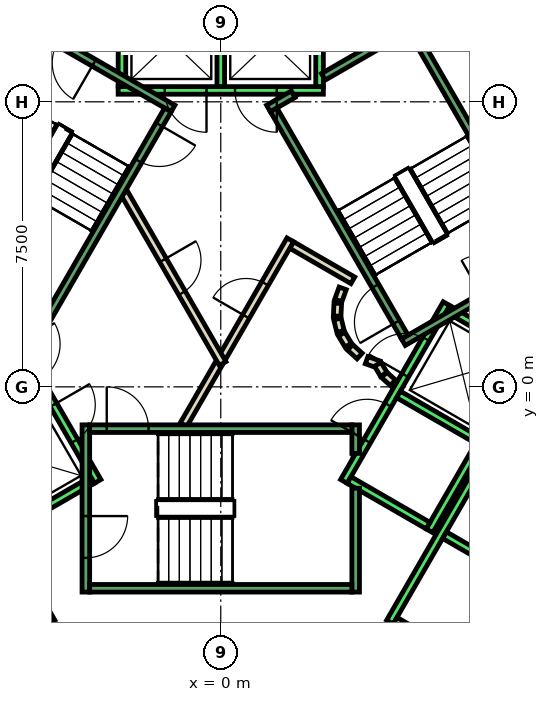
"""IFC4 building model, lengths in metres.
Left out: names, types, materials, properties, quantities, classifications, styles, units other than length and angle.
Written with IfcOpenShell. Run it as: python <this file> out.ifc"""

import sys

from ifc_helpers import new_model, si_unit, direction, frame, frame_2d, origin, place, context, subcontext, project, spatial, polyline, rectangle, outline, extrude, element, fill, save


model = new_model("IFC4")
c1 = context("Model", 3, precision=1e-05, world=origin(), true_north=direction((0.0, 1.0)))
c2 = subcontext(c1, "Body", "Model", "MODEL_VIEW")
j1 = project(units=[si_unit("LENGTHUNIT", "METRE"), si_unit("PLANEANGLEUNIT", "RADIAN")], contexts=[c1])
p1 = place(None, origin())
s1 = spatial("IfcSite", under=j1, at=p1, CompositionType="ELEMENT")
p2 = place(p1, origin())
s2 = spatial("IfcBuilding", under=s1, at=p2, CompositionType="ELEMENT")
p3 = place(p2, frame((0.0, 0.0, 184.4)))
s3 = spatial("IfcBuildingStorey", under=s2, at=p3, CompositionType="ELEMENT", Elevation=184.4)
p4 = place(p3, frame((0.0, 0.0, -0.6)))
e1 = element("IfcWall", 1, at=p4, inside=s3, PredefinedType="SHEAR", context=c2, shape_type="SweptSolid", body=[
    extrude(outline(polyline([(6.928, -9.5), (13.856, 2.5), (12.471, 2.5), (6.235, -8.3), (6.928, -9.5)])), origin(), (0.0, 0.0, 1.0), 5.4),
])
p5 = place(p3, frame((-0.982, -1.0, 0.0), z_axis=(0.0, 0.0, 1.0), x_axis=(0.50024047865, 0.865886518847, 0.0)))
e2 = element("IfcWall", 2, at=p5, inside=s3, PredefinedType="PARTITIONING", context=c2, shape_type="SweptSolid", body=[
    extrude(rectangle(XDim=1.863, YDim=0.2, at=frame_2d((0.931, 0.0))), origin(), (0.0, 0.0, 1.0), 4.8),
])
p6 = place(p3, frame((1.866, 3.732, 0.0), z_axis=(0.0, 0.0, 1.0), x_axis=(0.866043361281, -0.499968895414, 0.0)))
e3 = element("IfcWall", 3, at=p6, inside=s3, PredefinedType="PARTITIONING", context=c2, shape_type="SweptSolid", body=[
    extrude(rectangle(XDim=1.858, YDim=0.2, at=frame_2d((0.929, 0.0))), origin(), (0.0, 0.0, 1.0), 4.8),
])
p7 = place(p3, frame((3.208, 2.592, 0.0), z_axis=(0.0, 0.0, 1.0), x_axis=(-0.337388820924, -0.941365382578, 0.0)))
e4 = element("IfcWall", 4, at=p7, inside=s3, PredefinedType="PARTITIONING", context=c2, shape_type="SweptSolid", body=[
    extrude(rectangle(XDim=0.338, YDim=0.2, at=frame_2d((0.169, 0.0))), origin(), (0.0, 0.0, 1.0), 4.8),
])
p8 = place(p3, frame((3.079, 2.199, 0.0), z_axis=(0.0, 0.0, 1.0), x_axis=(-0.047771483479, -0.998858290933, 0.0)))
e5 = element("IfcWall", 5, at=p8, inside=s3, PredefinedType="PARTITIONING", context=c2, shape_type="SweptSolid", body=[
    extrude(rectangle(XDim=0.337, YDim=0.2, at=frame_2d((0.169, 0.0))), origin(), (0.0, 0.0, 1.0), 4.8),
])
p9 = place(p3, frame((3.07, 1.786, 0.0), z_axis=(0.0, 0.0, 1.0), x_axis=(0.242705583207, -0.970099994784, 0.0)))
e6 = element("IfcWall", 6, at=p9, inside=s3, PredefinedType="PARTITIONING", context=c2, shape_type="SweptSolid", body=[
    extrude(rectangle(XDim=0.338, YDim=0.2, at=frame_2d((0.169, 0.0))), origin(), (0.0, 0.0, 1.0), 4.8),
])
for number, where, z_axis, x_axis in (
    (7, (3.182, 1.388, 0.0), (0.0, 0.0, 1.0), (0.512, -0.859, 0.0)),
    (8, (3.404, 1.039, 0.0), (0.0, 0.0, 1.0), (0.74, -0.672, 0.0)),
):
    element("IfcWall", number, at=place(p3, frame(where, z_axis=z_axis, x_axis=x_axis)), inside=s3, PredefinedType="PARTITIONING", context=c2, shape_type="SweptSolid", body=[
        extrude(rectangle(XDim=0.338, YDim=0.2, at=frame_2d((0.169, 0.0))), origin(), (0.0, 0.0, 1.0), 4.8),
    ])
p10 = place(p3, frame((3.838, 0.702, 0.0), z_axis=(0.0, 0.0, 1.0), x_axis=(0.941035081519, -0.338308993895, 0.0)))
e9 = element("IfcWall", 9, at=p10, inside=s3, PredefinedType="PARTITIONING", context=c2, shape_type="SweptSolid", body=[
    extrude(rectangle(XDim=0.337, YDim=0.2, at=frame_2d((0.168, 0.0))), origin(), (0.0, 0.0, 1.0), 4.8),
])
p11 = place(p3, frame((4.132, 0.593, 0.0), z_axis=(0.0, 0.0, 1.0), x_axis=(0.513561617048, -0.858052717201, 0.0)))
e10 = element("IfcWall", 10, at=p11, inside=s3, PredefinedType="PARTITIONING", context=c2, shape_type="SweptSolid", body=[
    extrude(rectangle(XDim=0.308, YDim=0.2, at=frame_2d((0.154, 0.0))), origin(), (0.0, 0.0, 1.0), 4.8),
])
p12 = place(p3, frame((4.301, 0.315, 0.0), z_axis=(0.0, 0.0, 1.0), x_axis=(0.741798017506, -0.670623367639, 0.0)))
e11 = element("IfcWall", 11, at=p12, inside=s3, PredefinedType="PARTITIONING", context=c2, shape_type="SweptSolid", body=[
    extrude(rectangle(XDim=0.309, YDim=0.2, at=frame_2d((0.154, 0.0))), origin(), (0.0, 0.0, 1.0), 4.8),
])
p13 = place(p3, frame((0.05, 0.787, 0.0), z_axis=(0.0, 0.0, 1.0), x_axis=(0.499954076797, 0.866051915934, 0.0)))
e12 = element("IfcWall", 12, at=p13, inside=s3, PredefinedType="PARTITIONING", context=c2, shape_type="SweptSolid", body=[
    extrude(rectangle(XDim=3.558, YDim=0.2, at=frame_2d((1.779, 0.0))), origin(), (0.0, 0.0, 1.0), 4.8),
])
p14 = place(p13, frame((1.229, 0.0, 0.0)))
e13 = element("IfcOpeningElement", 13, at=p14, cuts=e12, PredefinedType="OPENING", context=c2, shape_type="SweptSolid", body=[
    extrude(rectangle(XDim=1.0, YDim=2.1, at=frame_2d((0.5, 1.05))), frame((0.0, 0.11, 0.0), z_axis=(0.0, -1.0, 0.0), x_axis=(1.0, 0.0, 0.0)), (0.0, 0.0, 1.0), 0.22),
])
p15 = place(p3, frame((-2.54, 5.1, 0.0), z_axis=(0.0, 0.0, 1.0), x_axis=(0.499925051871, -0.866068670783, 0.0)))
e14 = element("IfcWall", 14, at=p15, inside=s3, PredefinedType="PARTITIONING", context=c2, shape_type="SweptSolid", body=[
    extrude(rectangle(XDim=5.181, YDim=0.2, at=frame_2d((2.59, 0.0))), origin(), (0.0, 0.0, 1.0), 4.8),
])
p16 = place(p15, frame((2.04, 0.0, 0.0)))
e15 = element("IfcOpeningElement", 15, at=p16, cuts=e14, PredefinedType="OPENING", context=c2, shape_type="SweptSolid", body=[
    extrude(rectangle(XDim=1.0, YDim=2.1, at=frame_2d((0.5, 1.05))), frame((0.0, 0.11, 0.0), z_axis=(0.0, -1.0, 0.0), x_axis=(1.0, 0.0, 0.0)), (0.0, 0.0, 1.0), 0.22),
])
p17 = place(p3, frame((2.7, 7.8, 0.0), z_axis=(0.0, 0.0, 1.0), x_axis=(-1.0, 0.0, 0.0)))
e16 = element("IfcWall", 16, at=p17, inside=s3, PredefinedType="STANDARD", context=c2, shape_type="SweptSolid", body=[
    extrude(rectangle(XDim=5.4, YDim=0.2, at=frame_2d((2.7, 0.0))), origin(), (0.0, 0.0, 1.0), 4.8),
])
p18 = place(p17, frame((1.225, 0.0, 0.0)))
e17 = element("IfcOpeningElement", 17, at=p18, cuts=e16, PredefinedType="OPENING", context=c2, shape_type="SweptSolid", body=[
    extrude(rectangle(XDim=1.1, YDim=2.1, at=frame_2d((0.55, 1.05))), frame((0.0, 0.11, 0.0), z_axis=(0.0, -1.0, 0.0), x_axis=(1.0, 0.0, 0.0)), (0.0, 0.0, 1.0), 0.22),
])
p19 = place(p17, frame((3.075, 0.0, 0.0)))
e18 = element("IfcOpeningElement", 18, at=p19, cuts=e16, PredefinedType="OPENING", context=c2, shape_type="SweptSolid", body=[
    extrude(rectangle(XDim=1.1, YDim=2.1, at=frame_2d((0.55, 1.05))), frame((0.0, 0.11, 0.0), z_axis=(0.0, -1.0, 0.0), x_axis=(1.0, 0.0, 0.0)), (0.0, 0.0, 1.0), 0.22),
])
for number, where, z_axis, x_axis in (
    (19, (2.6, 7.9, 0.0), (0.0, 0.0, 1.0), (0.0, 1.0, 0.0)),
    (20, (0.0, 7.9, 0.0), (0.0, 0.0, 1.0), (0.0, 1.0, 0.0)),
    (21, (-2.6, 7.9, 0.0), (0.0, 0.0, 1.0), (0.0, 1.0, 0.0)),
):
    element("IfcWall", number, at=place(p3, frame(where, z_axis=z_axis, x_axis=x_axis)), inside=s3, PredefinedType="STANDARD", context=c2, shape_type="SweptSolid", body=[
        extrude(rectangle(XDim=2.4, YDim=0.2, at=frame_2d((1.2, 0.0))), origin(), (0.0, 0.0, 1.0), 4.8),
    ])
p20 = place(p3, frame((-5.94, 2.188, 0.0), z_axis=(0.0, 0.0, 1.0), x_axis=(0.500034260056, -0.866005622828, 0.0)))
e22 = element("IfcWall", 22, at=p20, inside=s3, PredefinedType="STANDARD", context=c2, shape_type="SweptSolid", body=[
    extrude(rectangle(XDim=5.399, YDim=0.2, at=frame_2d((2.7, 0.0))), origin(), (0.0, 0.0, 1.0), 4.8),
])
p21 = place(p20, frame((3.075, 0.0, 0.0)))
e23 = element("IfcOpeningElement", 23, at=p21, cuts=e22, PredefinedType="OPENING", context=c2, shape_type="SweptSolid", body=[
    extrude(rectangle(XDim=1.1, YDim=2.1, at=frame_2d((0.55, 1.05))), frame((0.0, 0.11, 0.0), z_axis=(0.0, -1.0, 0.0), x_axis=(1.0, 0.0, 0.0)), (0.0, 0.0, 1.0), 0.22),
])
p22 = place(p20, frame((1.225, 0.0, 0.0)))
e24 = element("IfcOpeningElement", 24, at=p22, cuts=e22, PredefinedType="OPENING", context=c2, shape_type="SweptSolid", body=[
    extrude(rectangle(XDim=1.1, YDim=2.1, at=frame_2d((0.55, 1.05))), frame((0.0, 0.11, 0.0), z_axis=(0.0, -1.0, 0.0), x_axis=(1.0, 0.0, 0.0)), (0.0, 0.0, 1.0), 0.22),
])
p23 = place(p3, frame((-3.377, -2.452, 0.0), z_axis=(0.0, 0.0, 1.0), x_axis=(-0.865955154139, -0.50012165622, 0.0)))
e25 = element("IfcWall", 25, at=p23, inside=s3, PredefinedType="STANDARD", context=c2, shape_type="SweptSolid", body=[
    extrude(rectangle(XDim=2.4, YDim=0.2, at=frame_2d((1.2, 0.0))), origin(), (0.0, 0.0, 1.0), 4.8),
])
p24 = place(p3, frame((-9.751, 2.99, 0.0), z_axis=(0.0, 0.0, 1.0), x_axis=(0.50000090737, -0.866024879913, 0.0)))
e26 = element("IfcWall", 26, at=p24, inside=s3, PredefinedType="STANDARD", context=c2, shape_type="SweptSolid", body=[
    extrude(rectangle(XDim=10.6, YDim=0.2, at=frame_2d((5.3, 0.0))), origin(), (0.0, 0.0, 1.0), 4.8),
])
p25 = place(p3, frame((3.24, -2.488, 0.0), z_axis=(0.0, 0.0, 1.0), x_axis=(0.500034260056, 0.866005622828, 0.0)))
e27 = element("IfcWall", 27, at=p25, inside=s3, PredefinedType="STANDARD", context=c2, shape_type="SweptSolid", body=[
    extrude(rectangle(XDim=5.399, YDim=0.2, at=frame_2d((2.7, 0.0))), origin(), (0.0, 0.0, 1.0), 4.8),
])
p26 = place(p25, frame((3.225, 0.0, 0.0)))
e28 = element("IfcOpeningElement", 28, at=p26, cuts=e27, PredefinedType="OPENING", context=c2, shape_type="SweptSolid", body=[
    extrude(rectangle(XDim=1.1, YDim=2.1, at=frame_2d((0.55, 1.05))), frame((0.0, 0.11, 0.0), z_axis=(0.0, -1.0, 0.0), x_axis=(1.0, 0.0, 0.0)), (0.0, 0.0, 1.0), 0.22),
])
p27 = place(p25, frame((1.225, 0.0, 0.0)))
e29 = element("IfcOpeningElement", 29, at=p27, cuts=e27, PredefinedType="OPENING", context=c2, shape_type="SweptSolid", body=[
    extrude(rectangle(XDim=1.1, YDim=2.1, at=frame_2d((0.55, 1.05))), frame((0.0, 0.11, 0.0), z_axis=(0.0, -1.0, 0.0), x_axis=(1.0, 0.0, 0.0)), (0.0, 0.0, 1.0), 0.22),
])
p28 = place(p3, frame((5.492, -3.788, 0.0), z_axis=(0.0, 0.0, 1.0), x_axis=(0.500034260056, 0.866005622828, 0.0)))
e30 = element("IfcWall", 30, at=p28, inside=s3, PredefinedType="STANDARD", context=c2, shape_type="SweptSolid", body=[
    extrude(rectangle(XDim=5.399, YDim=0.2, at=frame_2d((2.7, 0.0))), origin(), (0.0, 0.0, 1.0), 4.8),
])
p29 = place(p3, frame((3.377, -2.452, 0.0), z_axis=(0.0, 0.0, 1.0), x_axis=(0.865955154139, -0.50012165622, 0.0)))
e31 = element("IfcWall", 31, at=p29, inside=s3, PredefinedType="STANDARD", context=c2, shape_type="SweptSolid", body=[
    extrude(rectangle(XDim=2.4, YDim=0.2, at=frame_2d((1.2, 0.0))), origin(), (0.0, 0.0, 1.0), 4.8),
])
for number, where, z_axis, x_axis in (
    (32, (4.677, -0.2, 0.0), (0.0, 0.0, 1.0), (0.866, -0.5, 0.0)),
    (33, (5.977, 2.052, 0.0), (0.0, 0.0, 1.0), (0.866, -0.5, 0.0)),
):
    element("IfcWall", number, at=place(p3, frame(where, z_axis=z_axis, x_axis=x_axis)), inside=s3, PredefinedType="STANDARD", context=c2, shape_type="SweptSolid", body=[
        extrude(rectangle(XDim=2.399, YDim=0.2, at=frame_2d((1.2, 0.0))), origin(), (0.0, 0.0, 1.0), 4.8),
    ])
p30 = place(p3, frame((4.451, -6.19, 0.0), z_axis=(0.0, 0.0, 1.0), x_axis=(0.50000090737, 0.866024879913, 0.0)))
e34 = element("IfcWall", 34, at=p30, inside=s3, PredefinedType="STANDARD", context=c2, shape_type="SweptSolid", body=[
    extrude(rectangle(XDim=10.6, YDim=0.2, at=frame_2d((5.3, 0.0))), origin(), (0.0, 0.0, 1.0), 4.8),
])
for number, where, z_axis, x_axis in (
    (35, (4.588, -6.153, 0.0), (0.0, 0.0, 1.0), (0.866, -0.5, 0.0)),
    (36, (5.888, -3.902, 0.0), (0.0, 0.0, 1.0), (0.866, -0.5, 0.0)),
):
    element("IfcWall", number, at=place(p3, frame(where, z_axis=z_axis, x_axis=x_axis)), inside=s3, PredefinedType="STANDARD", context=c2, shape_type="SweptSolid", body=[
        extrude(rectangle(XDim=2.5, YDim=0.2, at=frame_2d((1.25, 0.0))), origin(), (0.0, 0.0, 1.0), 4.8),
    ])
p31 = place(p3, frame((-3.55, -1.0, 0.0), z_axis=(0.0, 0.0, 1.0), x_axis=(0.0, -1.0, 0.0)))
e37 = element("IfcWall", 37, at=p31, inside=s3, PredefinedType="STANDARD", context=c2, shape_type="SweptSolid", body=[
    extrude(rectangle(XDim=4.4, YDim=0.2, at=frame_2d((2.2, 0.0))), origin(), (0.0, 0.0, 1.0), 4.8),
])
p32 = place(p31, frame((2.4, 0.0, 0.0)))
e38 = element("IfcOpeningElement", 38, at=p32, cuts=e37, PredefinedType="OPENING", context=c2, shape_type="SweptSolid", body=[
    extrude(rectangle(XDim=1.1, YDim=2.2, at=frame_2d((0.55, 1.1))), frame((0.0, 0.11, 0.0), z_axis=(0.0, -1.0, 0.0), x_axis=(1.0, 0.0, 0.0)), (0.0, 0.0, 1.0), 0.22),
])
p33 = place(p3, frame((3.55, -2.667, 0.0), z_axis=(0.0, 0.0, 1.0), x_axis=(0.0, -1.0, 0.0)))
e39 = element("IfcWall", 39, at=p33, inside=s3, PredefinedType="STANDARD", context=c2, shape_type="SweptSolid", body=[
    extrude(rectangle(XDim=2.733, YDim=0.2, at=frame_2d((1.366, 0.0))), origin(), (0.0, 0.0, 1.0), 4.8),
])
p34 = place(p3, frame((3.55, -1.0, 0.0), z_axis=(0.0, 0.0, 1.0), x_axis=(0.0, -1.0, 0.0)))
e40 = element("IfcWall", 40, at=p34, inside=s3, PredefinedType="STANDARD", context=c2, shape_type="SweptSolid", body=[
    extrude(rectangle(XDim=0.751, YDim=0.2, at=frame_2d((0.375, 0.0))), origin(), (0.0, 0.0, 1.0), 4.8),
])
p35 = place(p3, frame((-3.45, -1.1, 0.0), z_axis=(0.0, 0.0, 1.0), x_axis=(1.0, 0.0, 0.0)))
e41 = element("IfcWall", 41, at=p35, inside=s3, PredefinedType="STANDARD", context=c2, shape_type="SweptSolid", body=[
    extrude(rectangle(XDim=6.9, YDim=0.2, at=frame_2d((3.45, 0.0))), origin(), (0.0, 0.0, 1.0), 4.8),
])
p36 = place(p35, frame((0.45, 0.0, 0.0)))
e42 = element("IfcOpeningElement", 42, at=p36, cuts=e41, PredefinedType="OPENING", context=c2, shape_type="SweptSolid", body=[
    extrude(rectangle(XDim=1.1, YDim=2.2, at=frame_2d((0.55, 1.1))), frame((0.0, 0.11, 0.0), z_axis=(0.0, -1.0, 0.0), x_axis=(1.0, 0.0, 0.0)), (0.0, 0.0, 1.0), 0.22),
])
p37 = place(p3, frame((-3.45, -5.3, 0.0), z_axis=(0.0, 0.0, 1.0), x_axis=(1.0, 0.0, 0.0)))
e43 = element("IfcWall", 43, at=p37, inside=s3, PredefinedType="STANDARD", context=c2, shape_type="SweptSolid", body=[
    extrude(rectangle(XDim=6.9, YDim=0.2, at=frame_2d((3.45, 0.0))), origin(), (0.0, 0.0, 1.0), 4.8),
])
p38 = place(p3, frame((4.806, 1.176, 0.0), z_axis=(0.0, 0.0, 1.0), x_axis=(0.866059941101, 0.499940174841, 0.0)))
e44 = element("IfcWall", 44, at=p38, inside=s3, PredefinedType="STANDARD", context=c2, shape_type="SweptSolid", body=[
    extrude(rectangle(XDim=4.4, YDim=0.2, at=frame_2d((2.2, 0.0))), origin(), (0.0, 0.0, 1.0), 4.8),
])
p39 = place(p38, frame((2.4, 0.0, 0.0)))
e45 = element("IfcOpeningElement", 45, at=p39, cuts=e44, PredefinedType="OPENING", context=c2, shape_type="SweptSolid", body=[
    extrude(rectangle(XDim=1.1, YDim=2.2, at=frame_2d((0.55, 1.1))), frame((0.0, 0.11, 0.0), z_axis=(0.0, -1.0, 0.0), x_axis=(1.0, 0.0, 0.0)), (0.0, 0.0, 1.0), 0.22),
])
p40 = place(p3, frame((2.7, 8.158, 0.0), z_axis=(0.0, 0.0, 1.0), x_axis=(0.86611865017, 0.499838457731, 0.0)))
e46 = element("IfcWall", 46, at=p40, inside=s3, PredefinedType="STANDARD", context=c2, shape_type="SweptSolid", body=[
    extrude(rectangle(XDim=2.733, YDim=0.2, at=frame_2d((1.366, 0.0))), origin(), (0.0, 0.0, 1.0), 4.8),
])
p41 = place(p3, frame((1.256, 7.324, 0.0), z_axis=(0.0, 0.0, 1.0), x_axis=(0.865915093549, 0.500191014278, 0.0)))
e47 = element("IfcWall", 47, at=p41, inside=s3, PredefinedType="STANDARD", context=c2, shape_type="SweptSolid", body=[
    extrude(rectangle(XDim=0.752, YDim=0.2, at=frame_2d((0.376, 0.0))), origin(), (0.0, 0.0, 1.0), 4.8),
])
p42 = place(p3, frame((4.843, 1.312, 0.0), z_axis=(0.0, 0.0, 1.0), x_axis=(-0.499963383562, 0.866046543262, 0.0)))
e48 = element("IfcWall", 48, at=p42, inside=s3, PredefinedType="STANDARD", context=c2, shape_type="SweptSolid", body=[
    extrude(rectangle(XDim=6.9, YDim=0.2, at=frame_2d((3.45, 0.0))), origin(), (0.0, 0.0, 1.0), 4.8),
])
p43 = place(p42, frame((0.45, 0.0, 0.0)))
e49 = element("IfcOpeningElement", 49, at=p43, cuts=e48, PredefinedType="OPENING", context=c2, shape_type="SweptSolid", body=[
    extrude(rectangle(XDim=1.1, YDim=2.2, at=frame_2d((0.55, 1.1))), frame((0.0, 0.11, 0.0), z_axis=(0.0, -1.0, 0.0), x_axis=(1.0, 0.0, 0.0)), (0.0, 0.0, 1.0), 0.22),
])
p44 = place(p3, frame((8.48, 3.412, 0.0), z_axis=(0.0, 0.0, 1.0), x_axis=(-0.499978703459, 0.866037698999, 0.0)))
e50 = element("IfcWall", 50, at=p44, inside=s3, PredefinedType="STANDARD", context=c2, shape_type="SweptSolid", body=[
    extrude(rectangle(XDim=6.9, YDim=0.2, at=frame_2d((3.45, 0.0))), origin(), (0.0, 0.0, 1.0), 4.8),
])
p45 = place(p3, frame((-1.256, 7.324, 0.0), z_axis=(0.0, 0.0, 1.0), x_axis=(-0.866046073146, 0.499964197906, 0.0)))
e51 = element("IfcWall", 51, at=p45, inside=s3, PredefinedType="STANDARD", context=c2, shape_type="SweptSolid", body=[
    extrude(rectangle(XDim=4.4, YDim=0.2, at=frame_2d((2.2, 0.0))), origin(), (0.0, 0.0, 1.0), 4.8),
])
p46 = place(p45, frame((2.4, 0.0, 0.0)))
e52 = element("IfcOpeningElement", 52, at=p46, cuts=e51, PredefinedType="OPENING", context=c2, shape_type="SweptSolid", body=[
    extrude(rectangle(XDim=1.1, YDim=2.2, at=frame_2d((0.55, 1.1))), frame((0.0, 0.11, 0.0), z_axis=(0.0, -1.0, 0.0), x_axis=(1.0, 0.0, 0.0)), (0.0, 0.0, 1.0), 0.22),
])
p47 = place(p3, frame((-1.393, 7.288, 0.0), z_axis=(0.0, 0.0, 1.0), x_axis=(-0.499963383562, -0.866046543262, 0.0)))
e53 = element("IfcWall", 53, at=p47, inside=s3, PredefinedType="STANDARD", context=c2, shape_type="SweptSolid", body=[
    extrude(rectangle(XDim=6.9, YDim=0.2, at=frame_2d((3.45, 0.0))), origin(), (0.0, 0.0, 1.0), 4.8),
])
p48 = place(p47, frame((0.45, 0.0, 0.0)))
e54 = element("IfcOpeningElement", 54, at=p48, cuts=e53, PredefinedType="OPENING", context=c2, shape_type="SweptSolid", body=[
    extrude(rectangle(XDim=1.1, YDim=2.2, at=frame_2d((0.55, 1.1))), frame((0.0, 0.11, 0.0), z_axis=(0.0, -1.0, 0.0), x_axis=(1.0, 0.0, 0.0)), (0.0, 0.0, 1.0), 0.22),
])
p49 = place(p14, origin())
e55 = element("IfcDoor", 55, at=p49, inside=s3, OperationType="SINGLE_SWING_RIGHT", PredefinedType="DOOR", context=c2, shape_type="SweptSolid", body=[
    extrude(rectangle(XDim=1.0, YDim=2.1, at=frame_2d((0.5, 1.05))), frame((0.0, 0.025, 0.0), z_axis=(0.0, -1.0, 0.0), x_axis=(1.0, 0.0, 0.0)), (0.0, 0.0, 1.0), 0.05),
])
fill(e13, e55)
p50 = place(p16, origin())
e56 = element("IfcDoor", 56, at=p50, inside=s3, OperationType="SINGLE_SWING_RIGHT", PredefinedType="DOOR", context=c2, shape_type="SweptSolid", body=[
    extrude(rectangle(XDim=1.0, YDim=2.1, at=frame_2d((0.5, 1.05))), frame((0.0, 0.025, 0.0), z_axis=(0.0, -1.0, 0.0), x_axis=(1.0, 0.0, 0.0)), (0.0, 0.0, 1.0), 0.05),
])
fill(e15, e56)
p51 = place(p18, origin())
e57 = element("IfcDoor", 57, at=p51, inside=s3, OperationType="SLIDING_TO_LEFT", PredefinedType="DOOR", context=c2, shape_type="SweptSolid", body=[
    extrude(rectangle(XDim=1.1, YDim=2.1, at=frame_2d((0.55, 1.05))), frame((0.0, 0.025, 0.0), z_axis=(0.0, -1.0, 0.0), x_axis=(1.0, 0.0, 0.0)), (0.0, 0.0, 1.0), 0.05),
])
fill(e17, e57)
p52 = place(p19, origin())
e58 = element("IfcDoor", 58, at=p52, inside=s3, OperationType="SLIDING_TO_LEFT", PredefinedType="DOOR", context=c2, shape_type="SweptSolid", body=[
    extrude(rectangle(XDim=1.1, YDim=2.1, at=frame_2d((0.55, 1.05))), frame((0.0, 0.025, 0.0), z_axis=(0.0, -1.0, 0.0), x_axis=(1.0, 0.0, 0.0)), (0.0, 0.0, 1.0), 0.05),
])
fill(e18, e58)
p53 = place(p26, origin())
e59 = element("IfcDoor", 59, at=p53, inside=s3, OperationType="SLIDING_TO_LEFT", PredefinedType="DOOR", context=c2, shape_type="SweptSolid", body=[
    extrude(rectangle(XDim=1.1, YDim=2.1, at=frame_2d((0.55, 1.05))), frame((0.0, 0.025, 0.0), z_axis=(0.0, -1.0, 0.0), x_axis=(1.0, 0.0, 0.0)), (0.0, 0.0, 1.0), 0.05),
])
fill(e28, e59)
p54 = place(p21, origin())
e60 = element("IfcDoor", 60, at=p54, inside=s3, OperationType="SLIDING_TO_LEFT", PredefinedType="DOOR", context=c2, shape_type="SweptSolid", body=[
    extrude(rectangle(XDim=1.1, YDim=2.1, at=frame_2d((0.55, 1.05))), frame((0.0, 0.025, 0.0), z_axis=(0.0, -1.0, 0.0), x_axis=(1.0, 0.0, 0.0)), (0.0, 0.0, 1.0), 0.05),
])
fill(e23, e60)
p55 = place(p27, origin())
e61 = element("IfcDoor", 61, at=p55, inside=s3, OperationType="SLIDING_TO_LEFT", PredefinedType="DOOR", context=c2, shape_type="SweptSolid", body=[
    extrude(rectangle(XDim=1.1, YDim=2.1, at=frame_2d((0.55, 1.05))), frame((0.0, 0.025, 0.0), z_axis=(0.0, -1.0, 0.0), x_axis=(1.0, 0.0, 0.0)), (0.0, 0.0, 1.0), 0.05),
])
fill(e29, e61)
p56 = place(p36, origin())
e62 = element("IfcDoor", 62, at=p56, inside=s3, OperationType="SINGLE_SWING_LEFT", PredefinedType="DOOR", context=c2, shape_type="SweptSolid", body=[
    extrude(rectangle(XDim=1.1, YDim=2.2, at=frame_2d((0.55, 1.1))), frame((0.0, 0.025, 0.0), z_axis=(0.0, -1.0, 0.0), x_axis=(1.0, 0.0, 0.0)), (0.0, 0.0, 1.0), 0.05),
])
fill(e42, e62)
p57 = place(p32, origin())
e63 = element("IfcDoor", 63, at=p57, inside=s3, OperationType="SINGLE_SWING_LEFT", PredefinedType="DOOR", context=c2, shape_type="SweptSolid", body=[
    extrude(rectangle(XDim=1.1, YDim=2.2, at=frame_2d((0.55, 1.1))), frame((0.0, 0.025, 0.0), z_axis=(0.0, -1.0, 0.0), x_axis=(1.0, 0.0, 0.0)), (0.0, 0.0, 1.0), 0.05),
])
fill(e38, e63)
p58 = place(p43, origin())
e64 = element("IfcDoor", 64, at=p58, inside=s3, OperationType="SINGLE_SWING_LEFT", PredefinedType="DOOR", context=c2, shape_type="SweptSolid", body=[
    extrude(rectangle(XDim=1.1, YDim=2.2, at=frame_2d((0.55, 1.1))), frame((0.0, 0.025, 0.0), z_axis=(0.0, -1.0, 0.0), x_axis=(1.0, 0.0, 0.0)), (0.0, 0.0, 1.0), 0.05),
])
fill(e49, e64)
p59 = place(p48, origin())
e65 = element("IfcDoor", 65, at=p59, inside=s3, OperationType="SINGLE_SWING_LEFT", PredefinedType="DOOR", context=c2, shape_type="SweptSolid", body=[
    extrude(rectangle(XDim=1.1, YDim=2.2, at=frame_2d((0.55, 1.1))), frame((0.0, 0.025, 0.0), z_axis=(0.0, -1.0, 0.0), x_axis=(1.0, 0.0, 0.0)), (0.0, 0.0, 1.0), 0.05),
])
fill(e54, e65)
p60 = place(p46, origin())
e66 = element("IfcDoor", 66, at=p60, inside=s3, OperationType="SINGLE_SWING_LEFT", PredefinedType="DOOR", context=c2, shape_type="SweptSolid", body=[
    extrude(rectangle(XDim=1.1, YDim=2.2, at=frame_2d((0.55, 1.1))), frame((0.0, 0.025, 0.0), z_axis=(0.0, -1.0, 0.0), x_axis=(1.0, 0.0, 0.0)), (0.0, 0.0, 1.0), 0.05),
])
fill(e52, e66)
save(model, sys.argv[1])
